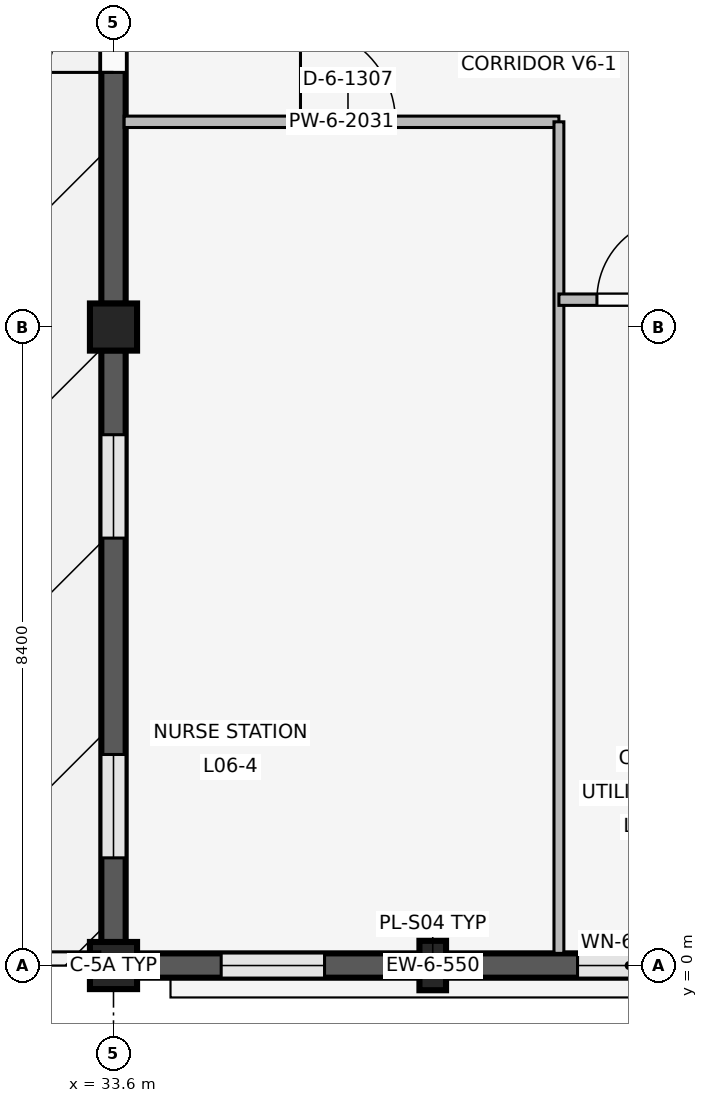
"""IFC4 building model, lengths in metres.
Left out: names, types, materials, properties, quantities, classifications, styles, units other than length and angle.
Written with IfcOpenShell. Run it as: python <this file> out.ifc"""

import sys

from ifc_helpers import new_model, si_unit, direction, frame, frame_2d, origin, origin_2d, place, context, subcontext, project, spatial, rectangle, extrude, element, fill, save


model = new_model("IFC4")
c1 = context("Model", 3, precision=1e-05, world=origin(), true_north=direction((0.0, 1.0)))
c2 = subcontext(c1, "Body", "Model", "MODEL_VIEW")
j1 = project(units=[si_unit("LENGTHUNIT", "METRE"), si_unit("PLANEANGLEUNIT", "RADIAN")], contexts=[c1])
p1 = place(None, origin())
s1 = spatial("IfcSite", under=j1, at=p1, CompositionType="ELEMENT")
p2 = place(p1, origin())
s2 = spatial("IfcBuilding", under=s1, at=p2, CompositionType="ELEMENT")
p3 = place(p2, frame((0.0, 0.0, 24.6)))
s3 = spatial("IfcBuildingStorey", under=s2, at=p3, CompositionType="ELEMENT", Elevation=24.6)
for number, where, z_axis, x_axis in (
    (1, (33.6, 0.0, 0.0), (0.0, 0.0, 1.0), (1.0, 0.0, 0.0)),
    (2, (33.6, 8.4, 0.0), (0.0, 0.0, 1.0), (1.0, 0.0, 0.0)),
):
    element("IfcColumn", number, at=place(p3, frame(where, z_axis=z_axis, x_axis=x_axis)), inside=s3, PredefinedType="COLUMN", context=c2, shape_type="SweptSolid", body=[
        extrude(rectangle(XDim=0.62, YDim=0.62, at=origin_2d()), origin(), (0.0, 0.0, 1.0), 4.2),
    ])
p4 = place(p3, frame((37.8, 0.0, 0.0), z_axis=(0.0, 0.0, 1.0), x_axis=(1.0, 0.0, 0.0)))
e3 = element("IfcColumn", 3, at=p4, inside=s3, PredefinedType="PILASTER", context=c2, shape_type="SweptSolid", body=[
    extrude(rectangle(XDim=0.35, YDim=0.65, at=origin_2d()), origin(), (0.0, 0.0, 1.0), 4.2),
])
p5 = place(p3, frame((41.695, 0.0, 0.0), z_axis=(0.0, 0.0, 1.0), x_axis=(-1.0, 0.0, 0.0)))
e4 = element("IfcWall", 4, at=p5, inside=s3, PredefinedType="SOLIDWALL", context=c2, shape_type="SweptSolid", body=[
    extrude(rectangle(XDim=7.79, YDim=0.32, at=frame_2d((3.895, 0.0))), origin(), (0.0, 0.0, 1.0), 3.34),
])
p6 = place(p5, frame((0.63, 0.0, 0.85)))
e5 = element("IfcOpeningElement", 5, at=p6, cuts=e4, PredefinedType="OPENING", context=c2, shape_type="SweptSolid", body=[
    extrude(rectangle(XDim=1.36, YDim=1.42, at=frame_2d((0.68, 0.71))), frame((0.0, 0.17, 0.0), z_axis=(0.0, -1.0, 0.0), x_axis=(1.0, 0.0, 0.0)), (0.0, 0.0, 1.0), 0.34),
])
p7 = place(p5, frame((5.318, 0.0, 0.85)))
e6 = element("IfcOpeningElement", 6, at=p7, cuts=e4, PredefinedType="OPENING", context=c2, shape_type="SweptSolid", body=[
    extrude(rectangle(XDim=1.36, YDim=1.42, at=frame_2d((0.68, 0.71))), frame((0.0, 0.17, 0.0), z_axis=(0.0, -1.0, 0.0), x_axis=(1.0, 0.0, 0.0)), (0.0, 0.0, 1.0), 0.34),
])
p8 = place(p3, frame((33.6, 0.305, 0.0), z_axis=(0.0, 0.0, 1.0), x_axis=(0.0, 1.0, 0.0)))
e7 = element("IfcWall", 7, at=p8, inside=s3, PredefinedType="SOLIDWALL", context=c2, shape_type="SweptSolid", body=[
    extrude(rectangle(XDim=7.79, YDim=0.32, at=frame_2d((3.895, 0.0))), origin(), (0.0, 0.0, 1.0), 3.34),
])
p9 = place(p8, frame((1.112, 0.0, 0.85)))
e8 = element("IfcOpeningElement", 8, at=p9, cuts=e7, PredefinedType="OPENING", context=c2, shape_type="SweptSolid", body=[
    extrude(rectangle(XDim=1.36, YDim=1.42, at=frame_2d((0.68, 0.71))), frame((0.0, 0.17, 0.0), z_axis=(0.0, -1.0, 0.0), x_axis=(1.0, 0.0, 0.0)), (0.0, 0.0, 1.0), 0.34),
])
p10 = place(p8, frame((5.318, 0.0, 0.85)))
e9 = element("IfcOpeningElement", 9, at=p10, cuts=e7, PredefinedType="OPENING", context=c2, shape_type="SweptSolid", body=[
    extrude(rectangle(XDim=1.36, YDim=1.42, at=frame_2d((0.68, 0.71))), frame((0.0, 0.17, 0.0), z_axis=(0.0, -1.0, 0.0), x_axis=(1.0, 0.0, 0.0)), (0.0, 0.0, 1.0), 0.34),
])
p11 = place(p3, frame((33.6, 8.705, 0.0), z_axis=(0.0, 0.0, 1.0), x_axis=(0.0, 1.0, 0.0)))
e10 = element("IfcWall", 10, at=p11, inside=s3, PredefinedType="SOLIDWALL", context=c2, shape_type="SweptSolid", body=[
    extrude(rectangle(XDim=7.79, YDim=0.32, at=frame_2d((3.895, 0.0))), origin(), (0.0, 0.0, 1.0), 3.34),
])
p12 = place(p11, frame((3.045, 0.0, 0.0)))
e11 = element("IfcOpeningElement", 11, at=p12, cuts=e10, PredefinedType="OPENING", context=c2, shape_type="SweptSolid", body=[
    extrude(rectangle(XDim=1.7, YDim=2.3, at=frame_2d((0.85, 1.15))), frame((0.0, 0.17, 0.0), z_axis=(0.0, -1.0, 0.0), x_axis=(1.0, 0.0, 0.0)), (0.0, 0.0, 1.0), 0.34),
])
p13 = place(p3, frame((33.74, 11.1, 0.0), z_axis=(0.0, 0.0, 1.0), x_axis=(1.0, 0.0, 0.0)))
e12 = element("IfcWall", 12, at=p13, inside=s3, PredefinedType="PARTITIONING", context=c2, shape_type="SweptSolid", body=[
    extrude(rectangle(XDim=5.72, YDim=0.15, at=frame_2d((2.86, 0.0))), origin(), (0.0, 0.0, 1.0), 3.32),
])
p14 = place(p13, frame((2.32, 0.0, 0.0)))
e13 = element("IfcOpeningElement", 13, at=p14, cuts=e12, PredefinedType="OPENING", context=c2, shape_type="SweptSolid", body=[
    extrude(rectangle(XDim=1.25, YDim=2.2, at=frame_2d((0.625, 1.1))), frame((0.0, 0.085, 0.0), z_axis=(0.0, -1.0, 0.0), x_axis=(1.0, 0.0, 0.0)), (0.0, 0.0, 1.0), 0.17),
])
p15 = place(p3, frame((39.46, 0.16, 0.0), z_axis=(0.0, 0.0, 1.0), x_axis=(0.0, 1.0, 0.0)))
e14 = element("IfcWall", 14, at=p15, inside=s3, PredefinedType="PARTITIONING", context=c2, shape_type="SweptSolid", body=[
    extrude(rectangle(XDim=10.94, YDim=0.13, at=frame_2d((5.47, 0.0))), origin(), (0.0, 0.0, 1.0), 3.32),
])
p16 = place(p3, frame((39.46, 8.76, 0.0), z_axis=(0.0, 0.0, 1.0), x_axis=(1.0, 0.0, 0.0)))
e15 = element("IfcWall", 15, at=p16, inside=s3, PredefinedType="PARTITIONING", context=c2, shape_type="SweptSolid", body=[
    extrude(rectangle(XDim=2.18, YDim=0.15, at=frame_2d((1.09, 0.0))), origin(), (0.0, 0.0, 1.0), 3.32),
])
p17 = place(p16, frame((0.5, 0.0, 0.0)))
e16 = element("IfcOpeningElement", 16, at=p17, cuts=e15, PredefinedType="OPENING", context=c2, shape_type="SweptSolid", body=[
    extrude(rectangle(XDim=1.08, YDim=2.15, at=frame_2d((0.54, 1.075))), frame((0.0, 0.085, 0.0), z_axis=(0.0, -1.0, 0.0), x_axis=(1.0, 0.0, 0.0)), (0.0, 0.0, 1.0), 0.17),
])
p18 = place(p6, origin())
e17 = element("IfcWindow", 17, at=p18, inside=s3, PartitioningType="SINGLE_PANEL", PredefinedType="WINDOW", context=c2, shape_type="SweptSolid", body=[
    extrude(rectangle(XDim=1.36, YDim=1.42, at=frame_2d((0.68, 0.71))), frame((0.0, 0.03, 0.0), z_axis=(0.0, -1.0, 0.0), x_axis=(1.0, 0.0, 0.0)), (0.0, 0.0, 1.0), 0.06),
])
fill(e5, e17)
p19 = place(p7, origin())
e18 = element("IfcWindow", 18, at=p19, inside=s3, PartitioningType="SINGLE_PANEL", PredefinedType="WINDOW", context=c2, shape_type="SweptSolid", body=[
    extrude(rectangle(XDim=1.36, YDim=1.42, at=frame_2d((0.68, 0.71))), frame((0.0, 0.03, 0.0), z_axis=(0.0, -1.0, 0.0), x_axis=(1.0, 0.0, 0.0)), (0.0, 0.0, 1.0), 0.06),
])
fill(e6, e18)
p20 = place(p9, origin())
e19 = element("IfcWindow", 19, at=p20, inside=s3, PartitioningType="SINGLE_PANEL", PredefinedType="WINDOW", context=c2, shape_type="SweptSolid", body=[
    extrude(rectangle(XDim=1.36, YDim=1.42, at=frame_2d((0.68, 0.71))), frame((0.0, 0.03, 0.0), z_axis=(0.0, -1.0, 0.0), x_axis=(1.0, 0.0, 0.0)), (0.0, 0.0, 1.0), 0.06),
])
fill(e8, e19)
p21 = place(p10, origin())
e20 = element("IfcWindow", 20, at=p21, inside=s3, PartitioningType="SINGLE_PANEL", PredefinedType="WINDOW", context=c2, shape_type="SweptSolid", body=[
    extrude(rectangle(XDim=1.36, YDim=1.42, at=frame_2d((0.68, 0.71))), frame((0.0, 0.03, 0.0), z_axis=(0.0, -1.0, 0.0), x_axis=(1.0, 0.0, 0.0)), (0.0, 0.0, 1.0), 0.06),
])
fill(e9, e20)
p22 = place(p12, origin())
e21 = element("IfcDoor", 21, at=p22, inside=s3, OperationType="DOUBLE_SWING_LEFT", PredefinedType="DOOR", context=c2, shape_type="SweptSolid", body=[
    extrude(rectangle(XDim=1.7, YDim=2.3, at=frame_2d((0.85, 1.15))), frame((0.0, 0.025, 0.0), z_axis=(0.0, -1.0, 0.0), x_axis=(1.0, 0.0, 0.0)), (0.0, 0.0, 1.0), 0.05),
])
fill(e11, e21)
p23 = place(p14, origin())
e22 = element("IfcDoor", 22, at=p23, inside=s3, OperationType="SINGLE_SWING_LEFT", PredefinedType="DOOR", context=c2, shape_type="SweptSolid", body=[
    extrude(rectangle(XDim=1.25, YDim=2.2, at=frame_2d((0.625, 1.1))), frame((0.0, 0.025, 0.0), z_axis=(0.0, -1.0, 0.0), x_axis=(1.0, 0.0, 0.0)), (0.0, 0.0, 1.0), 0.05),
])
fill(e13, e22)
p24 = place(p17, origin())
e23 = element("IfcDoor", 23, at=p24, inside=s3, OperationType="SINGLE_SWING_RIGHT", PredefinedType="DOOR", context=c2, shape_type="SweptSolid", body=[
    extrude(rectangle(XDim=1.08, YDim=2.15, at=frame_2d((0.54, 1.075))), frame((0.0, 0.025, 0.0), z_axis=(0.0, -1.0, 0.0), x_axis=(1.0, 0.0, 0.0)), (0.0, 0.0, 1.0), 0.05),
])
fill(e16, e23)
save(model, sys.argv[1])
